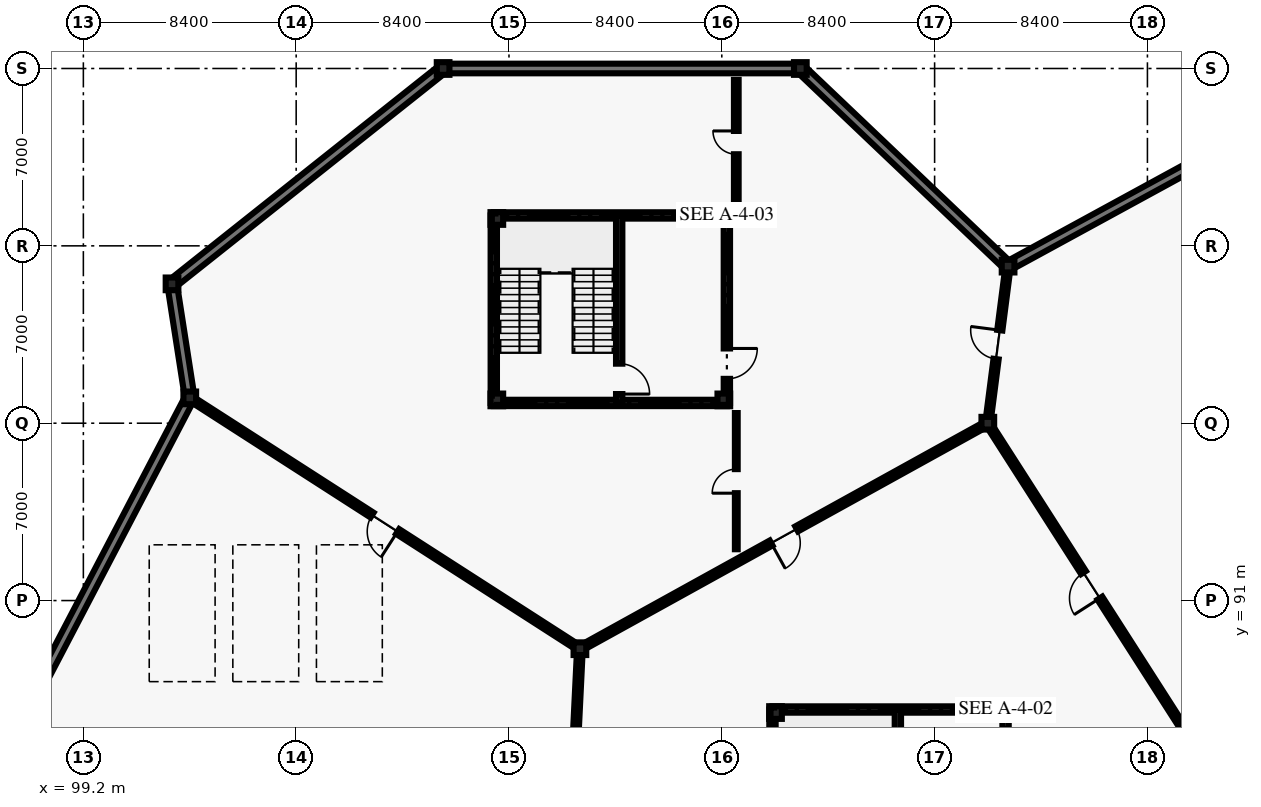
"""IFC4 building model, lengths in metres.
Left out: names, types, materials, properties, quantities, classifications, styles, units other than length and angle.
Written with IfcOpenShell. Run it as: python <this file> out.ifc"""

import sys

from ifc_helpers import new_model, si_unit, direction, frame, frame_2d, origin, origin_2d, place, context, subcontext, project, spatial, rectangle, i_section, extrude, element, fill, save


model = new_model("IFC4")
c1 = context("Model", 3, precision=1e-05, world=origin(), true_north=direction((0.0, 1.0)))
c2 = subcontext(c1, "Body", "Model", "MODEL_VIEW")
j1 = project(units=[si_unit("LENGTHUNIT", "METRE"), si_unit("PLANEANGLEUNIT", "RADIAN")], contexts=[c1])
p1 = place(None, origin())
s1 = spatial("IfcSite", under=j1, at=p1, CompositionType="ELEMENT")
p2 = place(p1, origin())
s2 = spatial("IfcBuilding", under=s1, at=p2, CompositionType="ELEMENT")
p3 = place(p2, frame((0.0, 0.0, -4.5)))
s3 = spatial("IfcBuildingStorey", under=s2, at=p3, CompositionType="ELEMENT", Elevation=-4.5)
for number, where, z_axis, x_axis in (
    (1, (102.7, 103.5, 0.0), (0.0, 0.0, 1.0), (1.0, 0.0, 0.0)),
    (2, (103.4, 99.0, 0.0), (0.0, 0.0, 1.0), (1.0, 0.0, 0.0)),
    (3, (113.4, 112.0, 0.0), (0.0, 0.0, 1.0), (1.0, 0.0, 0.0)),
    (4, (118.8, 89.1, 0.0), (0.0, 0.0, 1.0), (1.0, 0.0, 0.0)),
    (5, (127.5, 112.0, 0.0), (0.0, 0.0, 1.0), (1.0, 0.0, 0.0)),
    (6, (134.9, 98.0, 0.0), (0.0, 0.0, 1.0), (1.0, 0.0, 0.0)),
    (7, (135.7, 104.2, 0.0), (0.0, 0.0, 1.0), (1.0, 0.0, 0.0)),
    (8, (135.48, 86.58, 0.0), (0.0, 0.0, 1.0), (1.0, 0.0, 0.0)),
    (9, (126.52, 86.58, 0.0), (0.0, 0.0, 1.0), (1.0, 0.0, 0.0)),
    (10, (115.52, 98.92, 0.0), (0.0, 0.0, 1.0), (1.0, 0.0, 0.0)),
    (11, (124.48, 98.92, 0.0), (0.0, 0.0, 1.0), (1.0, 0.0, 0.0)),
    (12, (124.48, 106.08, 0.0), (0.0, 0.0, 1.0), (1.0, 0.0, 0.0)),
    (13, (115.52, 106.08, 0.0), (0.0, 0.0, 1.0), (1.0, 0.0, 0.0)),
):
    element("IfcColumn", number, at=place(p3, frame(where, z_axis=z_axis, x_axis=x_axis)), inside=s3, PredefinedType="COLUMN", context=c2, shape_type="SweptSolid", body=[
        extrude(i_section(OverallWidth=0.5, OverallDepth=0.5, WebThickness=0.022, FlangeThickness=0.036, at=origin_2d()), origin(), (0.0, 0.0, 1.0), 4.5),
    ])
p4 = place(p3, frame((103.377, 98.956, 0.0), z_axis=(0.0, 0.0, 1.0), x_axis=(-0.463016536886, -0.886349641264, 0.0)))
e14 = element("IfcWall", 14, at=p4, inside=s3, PredefinedType="USERDEFINED", context=c2, shape_type="SweptSolid", body=[
    extrude(rectangle(XDim=22.628, YDim=0.38, at=frame_2d((11.314, 0.0))), origin(), (0.0, 0.0, 1.0), 4.14),
])
p5 = place(p3, frame((135.664, 104.234, 0.0), z_axis=(0.0, 0.0, 1.0), x_axis=(-0.724544866469, 0.689227637631, 0.0)))
e15 = element("IfcWall", 15, at=p5, inside=s3, PredefinedType="USERDEFINED", context=c2, shape_type="SweptSolid", body=[
    extrude(rectangle(XDim=11.268, YDim=0.38, at=frame_2d((5.634, 0.0))), origin(), (0.0, 0.0, 1.0), 4.14),
])
p6 = place(p3, frame((127.5, 112.0, 0.0), z_axis=(0.0, 0.0, 1.0), x_axis=(-1.0, 0.0, 0.0)))
e16 = element("IfcWall", 16, at=p6, inside=s3, PredefinedType="USERDEFINED", context=c2, shape_type="SweptSolid", body=[
    extrude(rectangle(XDim=14.1, YDim=0.38, at=frame_2d((7.05, 0.0))), origin(), (0.0, 0.0, 1.0), 4.14),
])
p7 = place(p3, frame((113.4, 112.0, 0.0), z_axis=(0.0, 0.0, 1.0), x_axis=(-0.783004636427, -0.62201586743, 0.0)))
e17 = element("IfcWall", 17, at=p7, inside=s3, PredefinedType="USERDEFINED", context=c2, shape_type="SweptSolid", body=[
    extrude(rectangle(XDim=13.665, YDim=0.38, at=frame_2d((6.833, 0.0))), origin(), (0.0, 0.0, 1.0), 4.14),
])
p8 = place(p3, frame((102.7, 103.5, 0.0), z_axis=(0.0, 0.0, 1.0), x_axis=(0.153657614378, -0.988124150876, 0.0)))
e18 = element("IfcWall", 18, at=p8, inside=s3, PredefinedType="USERDEFINED", context=c2, shape_type="SweptSolid", body=[
    extrude(rectangle(XDim=4.504, YDim=0.38, at=frame_2d((2.252, 0.0))), origin(), (0.0, 0.0, 1.0), 4.14),
])
p9 = place(p3, frame((150.0, 112.0, 0.0), z_axis=(0.0, 0.0, 1.0), x_axis=(-0.87790016936, -0.478843703768, 0.0)))
e19 = element("IfcWall", 19, at=p9, inside=s3, PredefinedType="USERDEFINED", context=c2, shape_type="SweptSolid", body=[
    extrude(rectangle(XDim=16.239, YDim=0.38, at=frame_2d((8.119, 0.0))), origin(), (0.0, 0.0, 1.0), 4.14),
])
p10 = place(p3, frame((117.9, 70.6, 0.0), z_axis=(0.0, 0.0, 1.0), x_axis=(0.048599072515, 0.998818366947, 0.0)))
e20 = element("IfcWall", 20, at=p10, inside=s3, PredefinedType="SOLIDWALL", context=c2, shape_type="SweptSolid", body=[
    extrude(rectangle(XDim=18.522, YDim=0.225, at=frame_2d((9.261, 0.0))), origin(), (0.0, 0.0, 1.0), 4.14),
])
p11 = place(p10, frame((8.686, 0.0, 0.0)))
e21 = element("IfcOpeningElement", 21, at=p11, cuts=e20, PredefinedType="OPENING", context=c2, shape_type="SweptSolid", body=[
    extrude(rectangle(XDim=1.15, YDim=2.2, at=frame_2d((0.575, 1.1))), frame((0.0, 0.123, 0.0), z_axis=(0.0, -1.0, 0.0), x_axis=(1.0, 0.0, 0.0)), (0.0, 0.0, 1.0), 0.245),
])
p12 = place(p3, frame((118.8, 89.1, 0.0), z_axis=(0.0, 0.0, 1.0), x_axis=(-0.841183241423, 0.540750177392, 0.0)))
e22 = element("IfcWall", 22, at=p12, inside=s3, PredefinedType="SOLIDWALL", context=c2, shape_type="SweptSolid", body=[
    extrude(rectangle(XDim=18.308, YDim=0.225, at=frame_2d((9.154, 0.0))), origin(), (0.0, 0.0, 1.0), 4.14),
])
p13 = place(p12, frame((8.554, 0.0, 0.0)))
e23 = element("IfcOpeningElement", 23, at=p13, cuts=e22, PredefinedType="OPENING", context=c2, shape_type="SweptSolid", body=[
    extrude(rectangle(XDim=1.2, YDim=2.2, at=frame_2d((0.6, 1.1))), frame((0.0, 0.123, 0.0), z_axis=(0.0, -1.0, 0.0), x_axis=(1.0, 0.0, 0.0)), (0.0, 0.0, 1.0), 0.245),
])
p14 = place(p3, frame((134.9, 98.0, 0.0), z_axis=(0.0, 0.0, 1.0), x_axis=(-0.875181353329, -0.483794996652, 0.0)))
e24 = element("IfcWall", 24, at=p14, inside=s3, PredefinedType="SOLIDWALL", context=c2, shape_type="SweptSolid", body=[
    extrude(rectangle(XDim=18.396, YDim=0.225, at=frame_2d((9.198, 0.0))), origin(), (0.0, 0.0, 1.0), 4.14),
])
p15 = place(p14, frame((8.623, 0.0, 0.0)))
e25 = element("IfcOpeningElement", 25, at=p15, cuts=e24, PredefinedType="OPENING", context=c2, shape_type="SweptSolid", body=[
    extrude(rectangle(XDim=1.15, YDim=2.2, at=frame_2d((0.575, 1.1))), frame((0.0, 0.123, 0.0), z_axis=(0.0, -1.0, 0.0), x_axis=(1.0, 0.0, 0.0)), (0.0, 0.0, 1.0), 0.245),
])
p16 = place(p3, frame((143.1, 85.2, 0.0), z_axis=(0.0, 0.0, 1.0), x_axis=(-0.539434641352, 0.842027474439, 0.0)))
e26 = element("IfcWall", 26, at=p16, inside=s3, PredefinedType="SOLIDWALL", context=c2, shape_type="SweptSolid", body=[
    extrude(rectangle(XDim=15.201, YDim=0.225, at=frame_2d((7.601, 0.0))), origin(), (0.0, 0.0, 1.0), 4.14),
])
p17 = place(p16, frame((7.001, 0.0, 0.0)))
e27 = element("IfcOpeningElement", 27, at=p17, cuts=e26, PredefinedType="OPENING", context=c2, shape_type="SweptSolid", body=[
    extrude(rectangle(XDim=1.2, YDim=2.2, at=frame_2d((0.6, 1.1))), frame((0.0, 0.123, 0.0), z_axis=(0.0, -1.0, 0.0), x_axis=(1.0, 0.0, 0.0)), (0.0, 0.0, 1.0), 0.245),
])
p18 = place(p3, frame((134.9, 98.0, 0.0), z_axis=(0.0, 0.0, 1.0), x_axis=(0.127980011854, 0.991776747341, 0.0)))
e28 = element("IfcWall", 28, at=p18, inside=s3, PredefinedType="SOLIDWALL", context=c2, shape_type="SweptSolid", body=[
    extrude(rectangle(XDim=6.251, YDim=0.205, at=frame_2d((3.126, 0.0))), origin(), (0.0, 0.0, 1.0), 3.02),
])
p19 = place(p18, frame((2.551, 0.0, 0.0)))
e29 = element("IfcOpeningElement", 29, at=p19, cuts=e28, PredefinedType="OPENING", context=c2, shape_type="SweptSolid", body=[
    extrude(rectangle(XDim=1.15, YDim=2.2, at=frame_2d((0.575, 1.1))), frame((0.0, 0.113, 0.0), z_axis=(0.0, -1.0, 0.0), x_axis=(1.0, 0.0, 0.0)), (0.0, 0.0, 1.0), 0.225),
])
p20 = place(p3, frame((124.972, 93.026, 0.0), z_axis=(0.0, 0.0, 1.0), x_axis=(0.0, 1.0, 0.0)))
e30 = element("IfcWall", 30, at=p20, inside=s3, PredefinedType="PARTITIONING", context=c2, shape_type="SweptSolid", body=[
    extrude(rectangle(XDim=5.374, YDim=0.11, at=frame_2d((2.687, 0.0))), origin(), (0.0, 0.0, 1.0), 3.02),
])
p21 = place(p20, frame((2.212, 0.0, 0.0)))
e31 = element("IfcOpeningElement", 31, at=p21, cuts=e30, PredefinedType="OPENING", context=c2, shape_type="SweptSolid", body=[
    extrude(rectangle(XDim=0.95, YDim=2.15, at=frame_2d((0.475, 1.075))), frame((0.0, 0.065, 0.0), z_axis=(0.0, -1.0, 0.0), x_axis=(1.0, 0.0, 0.0)), (0.0, 0.0, 1.0), 0.13),
])
p22 = place(p3, frame((124.972, 106.6, 0.0), z_axis=(0.0, 0.0, 1.0), x_axis=(0.0, 1.0, 0.0)))
e32 = element("IfcWall", 32, at=p22, inside=s3, PredefinedType="PARTITIONING", context=c2, shape_type="SweptSolid", body=[
    extrude(rectangle(XDim=4.95, YDim=0.185, at=frame_2d((2.475, 0.0))), origin(), (0.0, 0.0, 1.0), 3.02),
])
p23 = place(p22, frame((2.015, 0.0, 0.0)))
e33 = element("IfcOpeningElement", 33, at=p23, cuts=e32, PredefinedType="OPENING", context=c2, shape_type="SweptSolid", body=[
    extrude(rectangle(XDim=0.92, YDim=2.1, at=frame_2d((0.46, 1.05))), frame((0.0, 0.103, 0.0), z_axis=(0.0, -1.0, 0.0), x_axis=(1.0, 0.0, 0.0)), (0.0, 0.0, 1.0), 0.205),
])
p24 = place(p3, frame((126.4, 79.3, 0.0), z_axis=(0.0, 0.0, 1.0), x_axis=(0.0, 1.0, 0.0)))
e34 = element("IfcWall", 34, at=p24, inside=s3, PredefinedType="SHEAR", context=c2, shape_type="SweptSolid", body=[
    extrude(rectangle(XDim=7.4, YDim=0.25, at=frame_2d((3.7, 0.0))), origin(), (0.0, 0.0, 1.0), 4.14),
])
p25 = place(p3, frame((126.4, 86.7, 0.0), z_axis=(0.0, 0.0, 1.0), x_axis=(1.0, 0.0, 0.0)))
e35 = element("IfcWall", 35, at=p25, inside=s3, PredefinedType="SHEAR", context=c2, shape_type="SweptSolid", body=[
    extrude(rectangle(XDim=9.2, YDim=0.25, at=frame_2d((4.6, 0.0))), origin(), (0.0, 0.0, 1.0), 4.14),
])
p26 = place(p3, frame((135.6, 86.7, 0.0), z_axis=(0.0, 0.0, 1.0), x_axis=(0.0, -1.0, 0.0)))
e36 = element("IfcWall", 36, at=p26, inside=s3, PredefinedType="SHEAR", context=c2, shape_type="SweptSolid", body=[
    extrude(rectangle(XDim=7.4, YDim=0.25, at=frame_2d((3.7, 0.0))), origin(), (0.0, 0.0, 1.0), 4.14),
])
p27 = place(p26, frame((5.25, 0.0, 0.0)))
e37 = element("IfcOpeningElement", 37, at=p27, cuts=e36, PredefinedType="OPENING", context=c2, shape_type="SweptSolid", body=[
    extrude(rectangle(XDim=1.2, YDim=2.2, at=frame_2d((0.6, 1.1))), frame((0.0, 0.135, 0.0), z_axis=(0.0, -1.0, 0.0), x_axis=(1.0, 0.0, 0.0)), (0.0, 0.0, 1.0), 0.27),
])
p28 = place(p3, frame((131.35, 86.7, 0.0), z_axis=(0.0, 0.0, 1.0), x_axis=(0.0, -1.0, 0.0)))
e38 = element("IfcWall", 38, at=p28, inside=s3, PredefinedType="SHEAR", context=c2, shape_type="SweptSolid", body=[
    extrude(rectangle(XDim=7.4, YDim=0.25, at=frame_2d((3.7, 0.0))), origin(), (0.0, 0.0, 1.0), 4.14),
])
p29 = place(p28, frame((5.85, 0.0, 0.0)))
e39 = element("IfcOpeningElement", 39, at=p29, cuts=e38, PredefinedType="OPENING", context=c2, shape_type="SweptSolid", body=[
    extrude(rectangle(XDim=1.2, YDim=2.2, at=frame_2d((0.6, 1.1))), frame((0.0, 0.135, 0.0), z_axis=(0.0, -1.0, 0.0), x_axis=(1.0, 0.0, 0.0)), (0.0, 0.0, 1.0), 0.27),
])
p30 = place(p3, frame((115.4, 98.8, 0.0), z_axis=(0.0, 0.0, 1.0), x_axis=(0.0, 1.0, 0.0)))
e40 = element("IfcWall", 40, at=p30, inside=s3, PredefinedType="SHEAR", context=c2, shape_type="SweptSolid", body=[
    extrude(rectangle(XDim=7.4, YDim=0.25, at=frame_2d((3.7, 0.0))), origin(), (0.0, 0.0, 1.0), 4.14),
])
for number, where, z_axis, x_axis in (
    (41, (115.4, 106.2, 0.0), (0.0, 0.0, 1.0), (1.0, 0.0, 0.0)),
    (42, (124.6, 98.8, 0.0), (0.0, 0.0, 1.0), (-1.0, 0.0, 0.0)),
):
    element("IfcWall", number, at=place(p3, frame(where, z_axis=z_axis, x_axis=x_axis)), inside=s3, PredefinedType="SHEAR", context=c2, shape_type="SweptSolid", body=[
        extrude(rectangle(XDim=9.2, YDim=0.25, at=frame_2d((4.6, 0.0))), origin(), (0.0, 0.0, 1.0), 4.14),
    ])
p31 = place(p3, frame((124.6, 106.2, 0.0), z_axis=(0.0, 0.0, 1.0), x_axis=(0.0, -1.0, 0.0)))
e43 = element("IfcWall", 43, at=p31, inside=s3, PredefinedType="SHEAR", context=c2, shape_type="SweptSolid", body=[
    extrude(rectangle(XDim=7.4, YDim=0.25, at=frame_2d((3.7, 0.0))), origin(), (0.0, 0.0, 1.0), 4.14),
])
p32 = place(p31, frame((5.25, 0.0, 0.0)))
e44 = element("IfcOpeningElement", 44, at=p32, cuts=e43, PredefinedType="OPENING", context=c2, shape_type="SweptSolid", body=[
    extrude(rectangle(XDim=1.2, YDim=2.2, at=frame_2d((0.6, 1.1))), frame((0.0, 0.135, 0.0), z_axis=(0.0, -1.0, 0.0), x_axis=(1.0, 0.0, 0.0)), (0.0, 0.0, 1.0), 0.27),
])
p33 = place(p3, frame((120.35, 106.2, 0.0), z_axis=(0.0, 0.0, 1.0), x_axis=(0.0, -1.0, 0.0)))
e45 = element("IfcWall", 45, at=p33, inside=s3, PredefinedType="SHEAR", context=c2, shape_type="SweptSolid", body=[
    extrude(rectangle(XDim=7.4, YDim=0.25, at=frame_2d((3.7, 0.0))), origin(), (0.0, 0.0, 1.0), 4.14),
])
p34 = place(p33, frame((5.85, 0.0, 0.0)))
e46 = element("IfcOpeningElement", 46, at=p34, cuts=e45, PredefinedType="OPENING", context=c2, shape_type="SweptSolid", body=[
    extrude(rectangle(XDim=1.2, YDim=2.2, at=frame_2d((0.6, 1.1))), frame((0.0, 0.135, 0.0), z_axis=(0.0, -1.0, 0.0), x_axis=(1.0, 0.0, 0.0)), (0.0, 0.0, 1.0), 0.27),
])
p35 = place(p13, origin())
e47 = element("IfcDoor", 47, at=p35, inside=s3, OperationType="SINGLE_SWING_LEFT", PredefinedType="DOOR", context=c2, shape_type="SweptSolid", body=[
    extrude(rectangle(XDim=1.2, YDim=2.2, at=frame_2d((0.6, 1.1))), frame((0.0, 0.025, 0.0), z_axis=(0.0, -1.0, 0.0), x_axis=(1.0, 0.0, 0.0)), (0.0, 0.0, 1.0), 0.05),
])
fill(e23, e47)
p36 = place(p15, origin())
e48 = element("IfcDoor", 48, at=p36, inside=s3, OperationType="SINGLE_SWING_RIGHT", PredefinedType="DOOR", context=c2, shape_type="SweptSolid", body=[
    extrude(rectangle(XDim=1.15, YDim=2.2, at=frame_2d((0.575, 1.1))), frame((0.0, 0.025, 0.0), z_axis=(0.0, -1.0, 0.0), x_axis=(1.0, 0.0, 0.0)), (0.0, 0.0, 1.0), 0.05),
])
fill(e25, e48)
p37 = place(p17, origin())
e49 = element("IfcDoor", 49, at=p37, inside=s3, OperationType="SINGLE_SWING_LEFT", PredefinedType="DOOR", context=c2, shape_type="SweptSolid", body=[
    extrude(rectangle(XDim=1.2, YDim=2.2, at=frame_2d((0.6, 1.1))), frame((0.0, 0.025, 0.0), z_axis=(0.0, -1.0, 0.0), x_axis=(1.0, 0.0, 0.0)), (0.0, 0.0, 1.0), 0.05),
])
fill(e27, e49)
p38 = place(p19, origin())
e50 = element("IfcDoor", 50, at=p38, inside=s3, OperationType="SINGLE_SWING_RIGHT", PredefinedType="DOOR", context=c2, shape_type="SweptSolid", body=[
    extrude(rectangle(XDim=1.15, YDim=2.2, at=frame_2d((0.575, 1.1))), frame((0.0, 0.025, 0.0), z_axis=(0.0, -1.0, 0.0), x_axis=(1.0, 0.0, 0.0)), (0.0, 0.0, 1.0), 0.05),
])
fill(e29, e50)
p39 = place(p21, origin())
e51 = element("IfcDoor", 51, at=p39, inside=s3, OperationType="SINGLE_SWING_LEFT", PredefinedType="DOOR", context=c2, shape_type="SweptSolid", body=[
    extrude(rectangle(XDim=0.95, YDim=2.15, at=frame_2d((0.475, 1.075))), frame((0.0, 0.025, 0.0), z_axis=(0.0, -1.0, 0.0), x_axis=(1.0, 0.0, 0.0)), (0.0, 0.0, 1.0), 0.05),
])
fill(e31, e51)
p40 = place(p23, origin())
e52 = element("IfcDoor", 52, at=p40, inside=s3, OperationType="SINGLE_SWING_RIGHT", PredefinedType="DOOR", context=c2, shape_type="SweptSolid", body=[
    extrude(rectangle(XDim=0.92, YDim=2.1, at=frame_2d((0.46, 1.05))), frame((0.0, 0.025, 0.0), z_axis=(0.0, -1.0, 0.0), x_axis=(1.0, 0.0, 0.0)), (0.0, 0.0, 1.0), 0.05),
])
fill(e33, e52)
p41 = place(p32, origin())
e53 = element("IfcDoor", 53, at=p41, inside=s3, OperationType="SINGLE_SWING_LEFT", PredefinedType="DOOR", context=c2, shape_type="SweptSolid", body=[
    extrude(rectangle(XDim=1.2, YDim=2.2, at=frame_2d((0.6, 1.1))), frame((0.0, 0.025, 0.0), z_axis=(0.0, -1.0, 0.0), x_axis=(1.0, 0.0, 0.0)), (0.0, 0.0, 1.0), 0.05),
])
fill(e44, e53)
p42 = place(p34, origin())
e54 = element("IfcDoor", 54, at=p42, inside=s3, OperationType="SINGLE_SWING_RIGHT", PredefinedType="DOOR", context=c2, shape_type="SweptSolid", body=[
    extrude(rectangle(XDim=1.2, YDim=2.2, at=frame_2d((0.6, 1.1))), frame((0.0, 0.025, 0.0), z_axis=(0.0, -1.0, 0.0), x_axis=(1.0, 0.0, 0.0)), (0.0, 0.0, 1.0), 0.05),
])
fill(e46, e54)
save(model, sys.argv[1])
